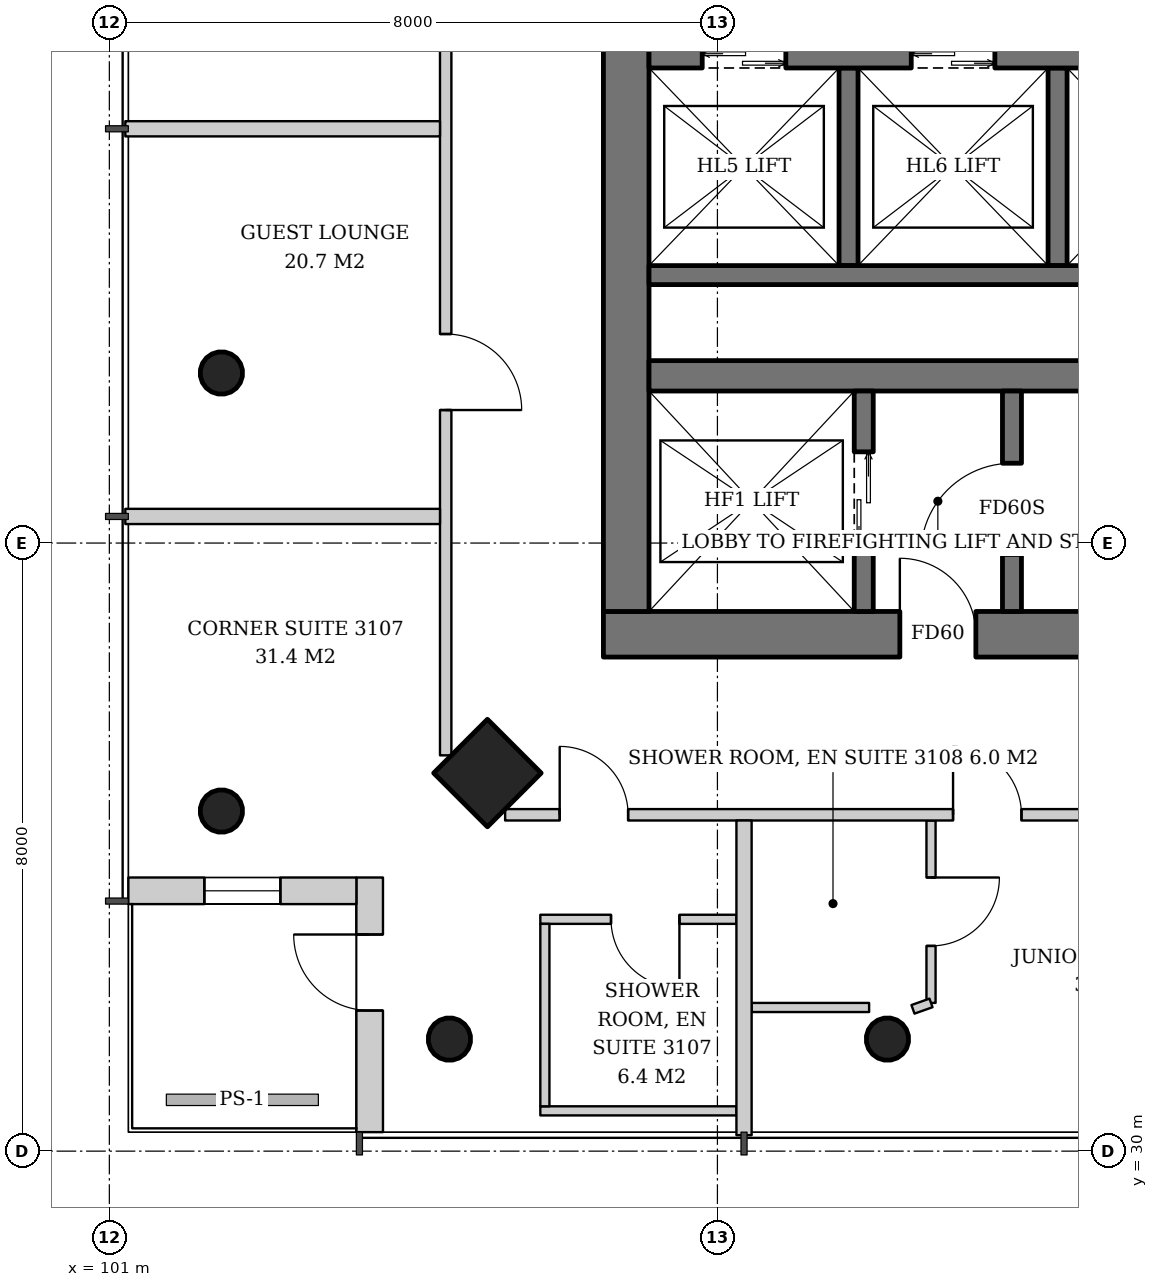
"""IFC4 building model, lengths in metres.
Left out: names, types, materials, properties, quantities, classifications, styles, units other than length and angle.
Written with IfcOpenShell. Run it as: python <this file> out.ifc"""

import sys

from ifc_helpers import new_model, si_unit, direction, frame, frame_2d, origin, origin_2d, place, context, subcontext, project, spatial, rectangle, hollow_circle, extrude, element, fill, save


model = new_model("IFC4")
c1 = context("Model", 3, precision=1e-05, world=origin(), true_north=direction((0.0, 1.0)))
c2 = subcontext(c1, "Body", "Model", "MODEL_VIEW")
j1 = project(units=[si_unit("LENGTHUNIT", "METRE"), si_unit("PLANEANGLEUNIT", "RADIAN")], contexts=[c1])
p1 = place(None, origin())
s1 = spatial("IfcSite", under=j1, at=p1, CompositionType="ELEMENT")
p2 = place(p1, origin())
s2 = spatial("IfcBuilding", under=s1, at=p2, CompositionType="ELEMENT")
p3 = place(p2, frame((0.0, 0.0, 123.6)))
s3 = spatial("IfcBuildingStorey", under=s2, at=p3, CompositionType="ELEMENT", Elevation=123.6)
p4 = place(p3, frame((105.922, 34.922, 0.0), z_axis=(0.043032401563, 0.043032401563, 0.998146494675), x_axis=(-0.707106781187, 0.707106781187, 0.0)))
e1 = element("IfcColumn", 1, at=p4, inside=s3, PredefinedType="COLUMN", context=c2, shape_type="SweptSolid", body=[
    extrude(rectangle(XDim=1.0, YDim=1.0, at=origin_2d()), origin(), (0.0, 0.0, 1.0), 3.807),
])
p5 = place(p3, frame((102.422, 34.422, 0.0), z_axis=(0.043032401563, 0.043032401563, 0.998146494675), x_axis=(-0.707106781187, 0.707106781187, 0.0)))
e2 = element("IfcColumn", 2, at=p5, inside=s3, PredefinedType="COLUMN", context=c2, shape_type="SweptSolid", body=[
    extrude(hollow_circle(Radius=0.28, WallThickness=0.02, at=origin_2d()), origin(), (0.0, 0.0, 1.0), 3.807),
])
p6 = place(p3, frame((102.422, 40.211, 0.0), z_axis=(0.043062285527, 0.021563230905, 0.998839660125), x_axis=(-0.44774654769, 0.894160516368, 0.0)))
e3 = element("IfcColumn", 3, at=p6, inside=s3, PredefinedType="COLUMN", context=c2, shape_type="SweptSolid", body=[
    extrude(hollow_circle(Radius=0.28, WallThickness=0.02, at=origin_2d()), origin(), (0.0, 0.0, 1.0), 3.804),
])
p7 = place(p3, frame((105.422, 31.422, 0.0), z_axis=(0.043032401563, 0.043032401563, 0.998146494675), x_axis=(-0.707106781187, 0.707106781187, 0.0)))
e4 = element("IfcColumn", 4, at=p7, inside=s3, PredefinedType="COLUMN", context=c2, shape_type="SweptSolid", body=[
    extrude(hollow_circle(Radius=0.28, WallThickness=0.02, at=origin_2d()), origin(), (0.0, 0.0, 1.0), 3.807),
])
p8 = place(p3, frame((111.211, 31.422, 0.0), z_axis=(0.021563230905, 0.043062285527, 0.998839660125), x_axis=(-0.894160516368, 0.44774654769, 0.0)))
e5 = element("IfcColumn", 5, at=p8, inside=s3, PredefinedType="COLUMN", context=c2, shape_type="SweptSolid", body=[
    extrude(hollow_circle(Radius=0.28, WallThickness=0.02, at=origin_2d()), origin(), (0.0, 0.0, 1.0), 3.804),
])
p9 = place(p3, frame((107.5, 36.8, 0.0), z_axis=(0.0, 0.0, 1.0), x_axis=(1.0, 0.0, 0.0)))
e6 = element("IfcWall", 6, at=p9, inside=s3, PredefinedType="SHEAR", context=c2, shape_type="SweptSolid", body=[
    extrude(rectangle(XDim=19.0, YDim=0.6, at=frame_2d((9.5, 0.0))), origin(), (0.0, 0.0, 1.0), 3.8),
])
p10 = place(p9, frame((3.9, 0.0, 0.0)))
e7 = element("IfcOpeningElement", 7, at=p10, cuts=e6, PredefinedType="OPENING", context=c2, shape_type="SweptSolid", body=[
    extrude(rectangle(XDim=1.0, YDim=2.1, at=frame_2d((0.5, 1.05))), frame((0.0, 0.31, 0.0), z_axis=(0.0, -1.0, 0.0), x_axis=(1.0, 0.0, 0.0)), (0.0, 0.0, 1.0), 0.62),
])
p11 = place(p9, frame((15.615, 0.0, 0.0)))
e8 = element("IfcOpeningElement", 8, at=p11, cuts=e6, PredefinedType="OPENING", context=c2, shape_type="SweptSolid", body=[
    extrude(rectangle(XDim=1.0, YDim=2.1, at=frame_2d((0.5, 1.05))), frame((0.0, 0.31, 0.0), z_axis=(0.0, -1.0, 0.0), x_axis=(1.0, 0.0, 0.0)), (0.0, 0.0, 1.0), 0.62),
])
p12 = place(p3, frame((107.8, 37.1, 0.0), z_axis=(0.0, 0.0, 1.0), x_axis=(0.0, 1.0, 0.0)))
e9 = element("IfcWall", 9, at=p12, inside=s3, PredefinedType="SHEAR", context=c2, shape_type="SweptSolid", body=[
    extrude(rectangle(XDim=17.8, YDim=0.6, at=frame_2d((8.9, 0.0))), origin(), (0.0, 0.0, 1.0), 3.8),
])
p13 = place(p12, frame((8.0, 0.0, 0.0)))
e10 = element("IfcOpeningElement", 10, at=p13, cuts=e9, PredefinedType="OPENING", context=c2, shape_type="SweptSolid", body=[
    extrude(rectangle(XDim=1.8, YDim=2.4, at=frame_2d((0.9, 1.2))), frame((0.0, 0.31, 0.0), z_axis=(0.0, -1.0, 0.0), x_axis=(1.0, 0.0, 0.0)), (0.0, 0.0, 1.0), 0.62),
])
p14 = place(p3, frame((108.1, 40.2, 0.0), z_axis=(0.0, 0.0, 1.0), x_axis=(1.0, 0.0, 0.0)))
e11 = element("IfcWall", 11, at=p14, inside=s3, PredefinedType="SHEAR", context=c2, shape_type="SweptSolid", body=[
    extrude(rectangle(XDim=17.8, YDim=0.4, at=frame_2d((8.9, 0.0))), origin(), (0.0, 0.0, 1.0), 3.8),
])
p15 = place(p3, frame((104.425, 30.25, 0.0), z_axis=(0.0, 0.0, 1.0), x_axis=(0.0, 1.0, 0.0)))
e12 = element("IfcWall", 12, at=p15, inside=s3, PredefinedType="SOLIDWALL", context=c2, shape_type="SweptSolid", body=[
    extrude(rectangle(XDim=3.35, YDim=0.35, at=frame_2d((1.675, 0.0))), origin(), (0.0, 0.0, 1.0), 3.6),
])
p16 = place(p15, frame((1.6, 0.0, 0.0)))
e13 = element("IfcOpeningElement", 13, at=p16, cuts=e12, PredefinedType="OPENING", context=c2, shape_type="SweptSolid", body=[
    extrude(rectangle(XDim=1.0, YDim=2.4, at=frame_2d((0.5, 1.2))), frame((0.0, 0.185, 0.0), z_axis=(0.0, -1.0, 0.0), x_axis=(1.0, 0.0, 0.0)), (0.0, 0.0, 1.0), 0.37),
])
p17 = place(p3, frame((104.25, 33.425, 0.0), z_axis=(0.0, 0.0, 1.0), x_axis=(-1.0, 0.0, 0.0)))
e14 = element("IfcWall", 14, at=p17, inside=s3, PredefinedType="SOLIDWALL", context=c2, shape_type="SweptSolid", body=[
    extrude(rectangle(XDim=3.0, YDim=0.35, at=frame_2d((1.5, 0.0))), origin(), (0.0, 0.0, 1.0), 3.6),
])
p18 = place(p17, frame((1.0, 0.0, 0.9)))
e15 = element("IfcOpeningElement", 15, at=p18, cuts=e14, PredefinedType="OPENING", context=c2, shape_type="SweptSolid", body=[
    extrude(rectangle(XDim=1.0, YDim=2.4, at=frame_2d((0.5, 1.2))), frame((0.0, 0.185, 0.0), z_axis=(0.0, -1.0, 0.0), x_axis=(1.0, 0.0, 0.0)), (0.0, 0.0, 1.0), 0.37),
])
p19 = place(p3, frame((110.925, 37.1, 0.0), z_axis=(0.0, 0.0, 1.0), x_axis=(0.0, 1.0, 0.0)))
e16 = element("IfcWall", 16, at=p19, inside=s3, PredefinedType="SHEAR", context=c2, shape_type="SweptSolid", body=[
    extrude(rectangle(XDim=2.9, YDim=0.25, at=frame_2d((1.45, 0.0))), origin(), (0.0, 0.0, 1.0), 3.8),
])
p20 = place(p19, frame((0.8, 0.0, 0.0)))
e17 = element("IfcOpeningElement", 17, at=p20, cuts=e16, PredefinedType="OPENING", context=c2, shape_type="SweptSolid", body=[
    extrude(rectangle(XDim=1.3, YDim=2.2, at=frame_2d((0.65, 1.1))), frame((0.0, 0.135, 0.0), z_axis=(0.0, -1.0, 0.0), x_axis=(1.0, 0.0, 0.0)), (0.0, 0.0, 1.0), 0.27),
])
p21 = place(p3, frame((112.875, 37.1, 0.0), z_axis=(0.0, 0.0, 1.0), x_axis=(0.0, 1.0, 0.0)))
e18 = element("IfcWall", 18, at=p21, inside=s3, PredefinedType="SHEAR", context=c2, shape_type="SweptSolid", body=[
    extrude(rectangle(XDim=2.9, YDim=0.25, at=frame_2d((1.45, 0.0))), origin(), (0.0, 0.0, 1.0), 3.8),
])
p22 = place(p21, frame((0.75, 0.0, 0.0)))
e19 = element("IfcOpeningElement", 19, at=p22, cuts=e18, PredefinedType="OPENING", context=c2, shape_type="SweptSolid", body=[
    extrude(rectangle(XDim=1.2, YDim=2.1, at=frame_2d((0.6, 1.05))), frame((0.0, 0.135, 0.0), z_axis=(0.0, -1.0, 0.0), x_axis=(1.0, 0.0, 0.0)), (0.0, 0.0, 1.0), 0.27),
])
for number, where, z_axis, x_axis in (
    (20, (110.725, 44.25, 0.0), (0.0, 0.0, 1.0), (0.0, -1.0, 0.0)),
    (21, (113.475, 44.25, 0.0), (0.0, 0.0, 1.0), (0.0, -1.0, 0.0)),
):
    element("IfcWall", number, at=place(p3, frame(where, z_axis=z_axis, x_axis=x_axis)), inside=s3, PredefinedType="SHEAR", context=c2, shape_type="SweptSolid", body=[
        extrude(rectangle(XDim=2.6, YDim=0.25, at=frame_2d((1.3, 0.0))), origin(), (0.0, 0.0, 1.0), 3.8),
    ])
p23 = place(p3, frame((108.1, 41.525, 0.0), z_axis=(0.0, 0.0, 1.0), x_axis=(1.0, 0.0, 0.0)))
e22 = element("IfcWall", 22, at=p23, inside=s3, PredefinedType="SHEAR", context=c2, shape_type="SweptSolid", body=[
    extrude(rectangle(XDim=11.0, YDim=0.25, at=frame_2d((5.5, 0.0))), origin(), (0.0, 0.0, 1.0), 3.8),
])
p24 = place(p3, frame((108.1, 44.375, 0.0), z_axis=(0.0, 0.0, 1.0), x_axis=(1.0, 0.0, 0.0)))
e23 = element("IfcWall", 23, at=p24, inside=s3, PredefinedType="SHEAR", context=c2, shape_type="SweptSolid", body=[
    extrude(rectangle(XDim=12.83, YDim=0.25, at=frame_2d((6.415, 0.0))), origin(), (0.0, 0.0, 1.0), 3.8),
])
p25 = place(p24, frame((0.7, 0.0, 0.0)))
e24 = element("IfcOpeningElement", 24, at=p25, cuts=e23, PredefinedType="OPENING", context=c2, shape_type="SweptSolid", body=[
    extrude(rectangle(XDim=1.1, YDim=2.2, at=frame_2d((0.55, 1.1))), frame((0.0, 0.135, 0.0), z_axis=(0.0, -1.0, 0.0), x_axis=(1.0, 0.0, 0.0)), (0.0, 0.0, 1.0), 0.27),
])
p26 = place(p24, frame((3.45, 0.0, 0.0)))
e25 = element("IfcOpeningElement", 25, at=p26, cuts=e23, PredefinedType="OPENING", context=c2, shape_type="SweptSolid", body=[
    extrude(rectangle(XDim=1.1, YDim=2.2, at=frame_2d((0.55, 1.1))), frame((0.0, 0.135, 0.0), z_axis=(0.0, -1.0, 0.0), x_axis=(1.0, 0.0, 0.0)), (0.0, 0.0, 1.0), 0.27),
])
p27 = place(p24, frame((6.2, 0.0, 0.0)))
e26 = element("IfcOpeningElement", 26, at=p27, cuts=e23, PredefinedType="OPENING", context=c2, shape_type="SweptSolid", body=[
    extrude(rectangle(XDim=1.1, YDim=2.2, at=frame_2d((0.55, 1.1))), frame((0.0, 0.135, 0.0), z_axis=(0.0, -1.0, 0.0), x_axis=(1.0, 0.0, 0.0)), (0.0, 0.0, 1.0), 0.27),
])
p28 = place(p24, frame((9.0, 0.0, 0.0)))
e27 = element("IfcOpeningElement", 27, at=p28, cuts=e23, PredefinedType="OPENING", context=c2, shape_type="SweptSolid", body=[
    extrude(rectangle(XDim=1.0, YDim=2.1, at=frame_2d((0.5, 1.05))), frame((0.0, 0.135, 0.0), z_axis=(0.0, -1.0, 0.0), x_axis=(1.0, 0.0, 0.0)), (0.0, 0.0, 1.0), 0.27),
])
p29 = place(p24, frame((11.515, 0.0, 0.0)))
e28 = element("IfcOpeningElement", 28, at=p29, cuts=e23, PredefinedType="OPENING", context=c2, shape_type="SweptSolid", body=[
    extrude(rectangle(XDim=0.8, YDim=2.0, at=frame_2d((0.4, 1.0))), frame((0.0, 0.135, 0.0), z_axis=(0.0, -1.0, 0.0), x_axis=(1.0, 0.0, 0.0)), (0.0, 0.0, 1.0), 0.27),
])
p30 = place(p3, frame((105.425, 56.793, 0.0), z_axis=(0.0, 0.0, 1.0), x_axis=(0.0, -1.0, 0.0)))
e29 = element("IfcWall", 29, at=p30, inside=s3, PredefinedType="PARTITIONING", context=c2, shape_type="SweptSolid", body=[
    extrude(rectangle(XDim=21.586, YDim=0.15, at=frame_2d((10.793, 0.0))), origin(), (0.0, 0.0, 1.0), 2.9),
])
p31 = place(p30, frame((0.718, 0.0, 0.0)))
e30 = element("IfcOpeningElement", 30, at=p31, cuts=e29, PredefinedType="OPENING", context=c2, shape_type="SweptSolid", body=[
    extrude(rectangle(XDim=0.9, YDim=2.1, at=frame_2d((0.45, 1.05))), frame((0.0, 0.085, 0.0), z_axis=(0.0, -1.0, 0.0), x_axis=(1.0, 0.0, 0.0)), (0.0, 0.0, 1.0), 0.17),
])
p32 = place(p30, frame((5.893, 0.0, 0.0)))
e31 = element("IfcOpeningElement", 31, at=p32, cuts=e29, PredefinedType="OPENING", context=c2, shape_type="SweptSolid", body=[
    extrude(rectangle(XDim=0.9, YDim=2.1, at=frame_2d((0.45, 1.05))), frame((0.0, 0.085, 0.0), z_axis=(0.0, -1.0, 0.0), x_axis=(1.0, 0.0, 0.0)), (0.0, 0.0, 1.0), 0.17),
])
p33 = place(p30, frame((16.043, 0.0, 0.0)))
e32 = element("IfcOpeningElement", 32, at=p33, cuts=e29, PredefinedType="OPENING", context=c2, shape_type="SweptSolid", body=[
    extrude(rectangle(XDim=1.0, YDim=2.1, at=frame_2d((0.5, 1.05))), frame((0.0, 0.085, 0.0), z_axis=(0.0, -1.0, 0.0), x_axis=(1.0, 0.0, 0.0)), (0.0, 0.0, 1.0), 0.17),
])
p34 = place(p3, frame((105.35, 43.45, 0.0), z_axis=(0.0, 0.0, 1.0), x_axis=(-1.0, 0.0, 0.0)))
e33 = element("IfcWall", 33, at=p34, inside=s3, PredefinedType="PARTITIONING", context=c2, shape_type="SweptSolid", body=[
    extrude(rectangle(XDim=4.14, YDim=0.2, at=frame_2d((2.07, 0.0))), origin(), (0.0, 0.0, 1.0), 2.65),
])
p35 = place(p3, frame((105.35, 38.35, 0.0), z_axis=(0.0, 0.0, 1.0), x_axis=(-1.0, 0.0, 0.0)))
e34 = element("IfcWall", 34, at=p35, inside=s3, PredefinedType="PARTITIONING", context=c2, shape_type="SweptSolid", body=[
    extrude(rectangle(XDim=4.14, YDim=0.2, at=frame_2d((2.07, 0.0))), origin(), (0.0, 0.0, 1.0), 3.2),
])
p36 = place(p3, frame((109.25, 33.05, 0.0), z_axis=(0.0, 0.0, 1.0), x_axis=(-1.0, 0.0, 0.0)))
e35 = element("IfcWall", 35, at=p36, inside=s3, PredefinedType="PARTITIONING", context=c2, shape_type="SweptSolid", body=[
    extrude(rectangle(XDim=2.58, YDim=0.12, at=frame_2d((1.29, 0.0))), origin(), (0.0, 0.0, 1.0), 2.9),
])
p37 = place(p36, frame((0.75, 0.0, 0.0)))
e36 = element("IfcOpeningElement", 36, at=p37, cuts=e35, PredefinedType="OPENING", context=c2, shape_type="SweptSolid", body=[
    extrude(rectangle(XDim=0.9, YDim=2.1, at=frame_2d((0.45, 1.05))), frame((0.0, 0.07, 0.0), z_axis=(0.0, -1.0, 0.0), x_axis=(1.0, 0.0, 0.0)), (0.0, 0.0, 1.0), 0.14),
])
p38 = place(p3, frame((109.25, 30.53, 0.0), z_axis=(0.0, 0.0, 1.0), x_axis=(-1.0, 0.0, 0.0)))
e37 = element("IfcWall", 37, at=p38, inside=s3, PredefinedType="PARTITIONING", context=c2, shape_type="SweptSolid", body=[
    extrude(rectangle(XDim=2.58, YDim=0.12, at=frame_2d((1.29, 0.0))), origin(), (0.0, 0.0, 1.0), 3.6),
])
p39 = place(p3, frame((106.73, 32.99, 0.0), z_axis=(0.0, 0.0, 1.0), x_axis=(0.0, -1.0, 0.0)))
e38 = element("IfcWall", 38, at=p39, inside=s3, PredefinedType="PARTITIONING", context=c2, shape_type="SweptSolid", body=[
    extrude(rectangle(XDim=2.4, YDim=0.12, at=frame_2d((1.2, 0.0))), origin(), (0.0, 0.0, 1.0), 3.2),
])
p40 = place(p3, frame((109.45, 31.89, 0.0), z_axis=(0.0, 0.0, 1.0), x_axis=(1.0, 0.0, 0.0)))
e39 = element("IfcWall", 39, at=p40, inside=s3, PredefinedType="PARTITIONING", context=c2, shape_type="SweptSolid", body=[
    extrude(rectangle(XDim=1.546, YDim=0.12, at=frame_2d((0.773, 0.0))), origin(), (0.0, 0.0, 1.0), 3.6),
])
p41 = place(p3, frame((111.81, 34.35, 0.0), z_axis=(0.0, 0.0, 1.0), x_axis=(0.0, -1.0, 0.0)))
e40 = element("IfcWall", 40, at=p41, inside=s3, PredefinedType="PARTITIONING", context=c2, shape_type="SweptSolid", body=[
    extrude(rectangle(XDim=2.4, YDim=0.12, at=frame_2d((1.2, 0.0))), origin(), (0.0, 0.0, 1.0), 3.0),
])
p42 = place(p41, frame((0.75, 0.0, 0.0)))
e41 = element("IfcOpeningElement", 41, at=p42, cuts=e40, PredefinedType="OPENING", context=c2, shape_type="SweptSolid", body=[
    extrude(rectangle(XDim=0.9, YDim=2.1, at=frame_2d((0.45, 1.05))), frame((0.0, 0.07, 0.0), z_axis=(0.0, -1.0, 0.0), x_axis=(1.0, 0.0, 0.0)), (0.0, 0.0, 1.0), 0.14),
])
p43 = place(p3, frame((106.207, 34.425, 0.0), z_axis=(0.0, 0.0, 1.0), x_axis=(1.0, 0.0, 0.0)))
e42 = element("IfcWall", 42, at=p43, inside=s3, PredefinedType="PARTITIONING", context=c2, shape_type="SweptSolid", body=[
    extrude(rectangle(XDim=21.586, YDim=0.15, at=frame_2d((10.793, 0.0))), origin(), (0.0, 0.0, 1.0), 2.9),
])
p44 = place(p43, frame((0.718, 0.0, 0.0)))
e43 = element("IfcOpeningElement", 43, at=p44, cuts=e42, PredefinedType="OPENING", context=c2, shape_type="SweptSolid", body=[
    extrude(rectangle(XDim=0.9, YDim=2.1, at=frame_2d((0.45, 1.05))), frame((0.0, 0.085, 0.0), z_axis=(0.0, -1.0, 0.0), x_axis=(1.0, 0.0, 0.0)), (0.0, 0.0, 1.0), 0.17),
])
p45 = place(p43, frame((5.893, 0.0, 0.0)))
e44 = element("IfcOpeningElement", 44, at=p45, cuts=e42, PredefinedType="OPENING", context=c2, shape_type="SweptSolid", body=[
    extrude(rectangle(XDim=0.9, YDim=2.1, at=frame_2d((0.45, 1.05))), frame((0.0, 0.085, 0.0), z_axis=(0.0, -1.0, 0.0), x_axis=(1.0, 0.0, 0.0)), (0.0, 0.0, 1.0), 0.17),
])
p46 = place(p43, frame((16.043, 0.0, 0.0)))
e45 = element("IfcOpeningElement", 45, at=p46, cuts=e42, PredefinedType="OPENING", context=c2, shape_type="SweptSolid", body=[
    extrude(rectangle(XDim=1.0, YDim=2.1, at=frame_2d((0.5, 1.05))), frame((0.0, 0.085, 0.0), z_axis=(0.0, -1.0, 0.0), x_axis=(1.0, 0.0, 0.0)), (0.0, 0.0, 1.0), 0.17),
])
p47 = place(p3, frame((109.35, 34.35, 0.0), z_axis=(0.0, 0.0, 1.0), x_axis=(0.0, -1.0, 0.0)))
e46 = element("IfcWall", 46, at=p47, inside=s3, PredefinedType="PARTITIONING", context=c2, shape_type="SweptSolid", body=[
    extrude(rectangle(XDim=4.14, YDim=0.2, at=frame_2d((2.07, 0.0))), origin(), (0.0, 0.0, 1.0), 3.2),
])
p48 = place(p3, frame((111.81, 31.95, 0.0), z_axis=(0.0, 0.0, 1.0), x_axis=(-0.942506501315, -0.33418781393, 0.0)))
e47 = element("IfcWall", 47, at=p48, inside=s3, PredefinedType="PARTITIONING", context=c2, shape_type="SweptSolid", body=[
    extrude(rectangle(XDim=0.252, YDim=0.12, at=frame_2d((0.126, 0.0))), origin(), (0.0, 0.0, 1.0), 3.0),
])
p49 = place(p16, origin())
e48 = element("IfcDoor", 48, at=p49, inside=s3, OperationType="SINGLE_SWING_RIGHT", PredefinedType="DOOR", context=c2, shape_type="SweptSolid", body=[
    extrude(rectangle(XDim=1.0, YDim=2.4, at=frame_2d((0.5, 1.2))), frame((0.0, 0.025, 0.0), z_axis=(0.0, -1.0, 0.0), x_axis=(1.0, 0.0, 0.0)), (0.0, 0.0, 1.0), 0.05),
])
fill(e13, e48)
p50 = place(p18, origin())
e49 = element("IfcWindow", 49, at=p50, inside=s3, PartitioningType="SINGLE_PANEL", PredefinedType="WINDOW", context=c2, shape_type="SweptSolid", body=[
    extrude(rectangle(XDim=1.0, YDim=2.4, at=frame_2d((0.5, 1.2))), frame((0.0, 0.03, 0.0), z_axis=(0.0, -1.0, 0.0), x_axis=(1.0, 0.0, 0.0)), (0.0, 0.0, 1.0), 0.06),
])
fill(e15, e49)
p51 = place(p20, origin())
e50 = element("IfcDoor", 50, at=p51, inside=s3, OperationType="DOUBLE_DOOR_SLIDING", PredefinedType="DOOR", context=c2, shape_type="SweptSolid", body=[
    extrude(rectangle(XDim=1.3, YDim=2.2, at=frame_2d((0.65, 1.1))), frame((0.0, 0.025, 0.0), z_axis=(0.0, -1.0, 0.0), x_axis=(1.0, 0.0, 0.0)), (0.0, 0.0, 1.0), 0.05),
])
fill(e17, e50)
p52 = place(p22, origin())
e51 = element("IfcDoor", 51, at=p52, inside=s3, OperationType="SINGLE_SWING_LEFT", PredefinedType="DOOR", context=c2, shape_type="SweptSolid", body=[
    extrude(rectangle(XDim=1.2, YDim=2.1, at=frame_2d((0.6, 1.05))), frame((0.0, 0.025, 0.0), z_axis=(0.0, -1.0, 0.0), x_axis=(1.0, 0.0, 0.0)), (0.0, 0.0, 1.0), 0.05),
])
fill(e19, e51)
p53 = place(p25, origin())
e52 = element("IfcDoor", 52, at=p53, inside=s3, OperationType="DOUBLE_DOOR_SLIDING", PredefinedType="DOOR", context=c2, shape_type="SweptSolid", body=[
    extrude(rectangle(XDim=1.1, YDim=2.2, at=frame_2d((0.55, 1.1))), frame((0.0, 0.025, 0.0), z_axis=(0.0, -1.0, 0.0), x_axis=(1.0, 0.0, 0.0)), (0.0, 0.0, 1.0), 0.05),
])
fill(e24, e52)
p54 = place(p26, origin())
e53 = element("IfcDoor", 53, at=p54, inside=s3, OperationType="DOUBLE_DOOR_SLIDING", PredefinedType="DOOR", context=c2, shape_type="SweptSolid", body=[
    extrude(rectangle(XDim=1.1, YDim=2.2, at=frame_2d((0.55, 1.1))), frame((0.0, 0.025, 0.0), z_axis=(0.0, -1.0, 0.0), x_axis=(1.0, 0.0, 0.0)), (0.0, 0.0, 1.0), 0.05),
])
fill(e25, e53)
p55 = place(p10, origin())
e54 = element("IfcDoor", 54, at=p55, inside=s3, OperationType="SINGLE_SWING_LEFT", PredefinedType="DOOR", context=c2, shape_type="SweptSolid", body=[
    extrude(rectangle(XDim=1.0, YDim=2.1, at=frame_2d((0.5, 1.05))), frame((0.0, 0.025, 0.0), z_axis=(0.0, -1.0, 0.0), x_axis=(1.0, 0.0, 0.0)), (0.0, 0.0, 1.0), 0.05),
])
fill(e7, e54)
p56 = place(p33, origin())
e55 = element("IfcDoor", 55, at=p56, inside=s3, OperationType="SINGLE_SWING_RIGHT", PredefinedType="DOOR", context=c2, shape_type="SweptSolid", body=[
    extrude(rectangle(XDim=1.0, YDim=2.1, at=frame_2d((0.5, 1.05))), frame((0.0, 0.025, 0.0), z_axis=(0.0, -1.0, 0.0), x_axis=(1.0, 0.0, 0.0)), (0.0, 0.0, 1.0), 0.05),
])
fill(e32, e55)
p57 = place(p37, origin())
e56 = element("IfcDoor", 56, at=p57, inside=s3, OperationType="SINGLE_SWING_LEFT", PredefinedType="DOOR", context=c2, shape_type="SweptSolid", body=[
    extrude(rectangle(XDim=0.9, YDim=2.1, at=frame_2d((0.45, 1.05))), frame((0.0, 0.025, 0.0), z_axis=(0.0, -1.0, 0.0), x_axis=(1.0, 0.0, 0.0)), (0.0, 0.0, 1.0), 0.05),
])
fill(e36, e56)
p58 = place(p42, origin())
e57 = element("IfcDoor", 57, at=p58, inside=s3, OperationType="SINGLE_SWING_LEFT", PredefinedType="DOOR", context=c2, shape_type="SweptSolid", body=[
    extrude(rectangle(XDim=0.9, YDim=2.1, at=frame_2d((0.45, 1.05))), frame((0.0, 0.025, 0.0), z_axis=(0.0, -1.0, 0.0), x_axis=(1.0, 0.0, 0.0)), (0.0, 0.0, 1.0), 0.05),
])
fill(e41, e57)
p59 = place(p44, origin())
e58 = element("IfcDoor", 58, at=p59, inside=s3, OperationType="SINGLE_SWING_LEFT", PredefinedType="DOOR", context=c2, shape_type="SweptSolid", body=[
    extrude(rectangle(XDim=0.9, YDim=2.1, at=frame_2d((0.45, 1.05))), frame((0.0, 0.025, 0.0), z_axis=(0.0, -1.0, 0.0), x_axis=(1.0, 0.0, 0.0)), (0.0, 0.0, 1.0), 0.05),
])
fill(e43, e58)
p60 = place(p45, origin())
e59 = element("IfcDoor", 59, at=p60, inside=s3, OperationType="SINGLE_SWING_LEFT", PredefinedType="DOOR", context=c2, shape_type="SweptSolid", body=[
    extrude(rectangle(XDim=0.9, YDim=2.1, at=frame_2d((0.45, 1.05))), frame((0.0, 0.025, 0.0), z_axis=(0.0, -1.0, 0.0), x_axis=(1.0, 0.0, 0.0)), (0.0, 0.0, 1.0), 0.05),
])
fill(e44, e59)
save(model, sys.argv[1])
